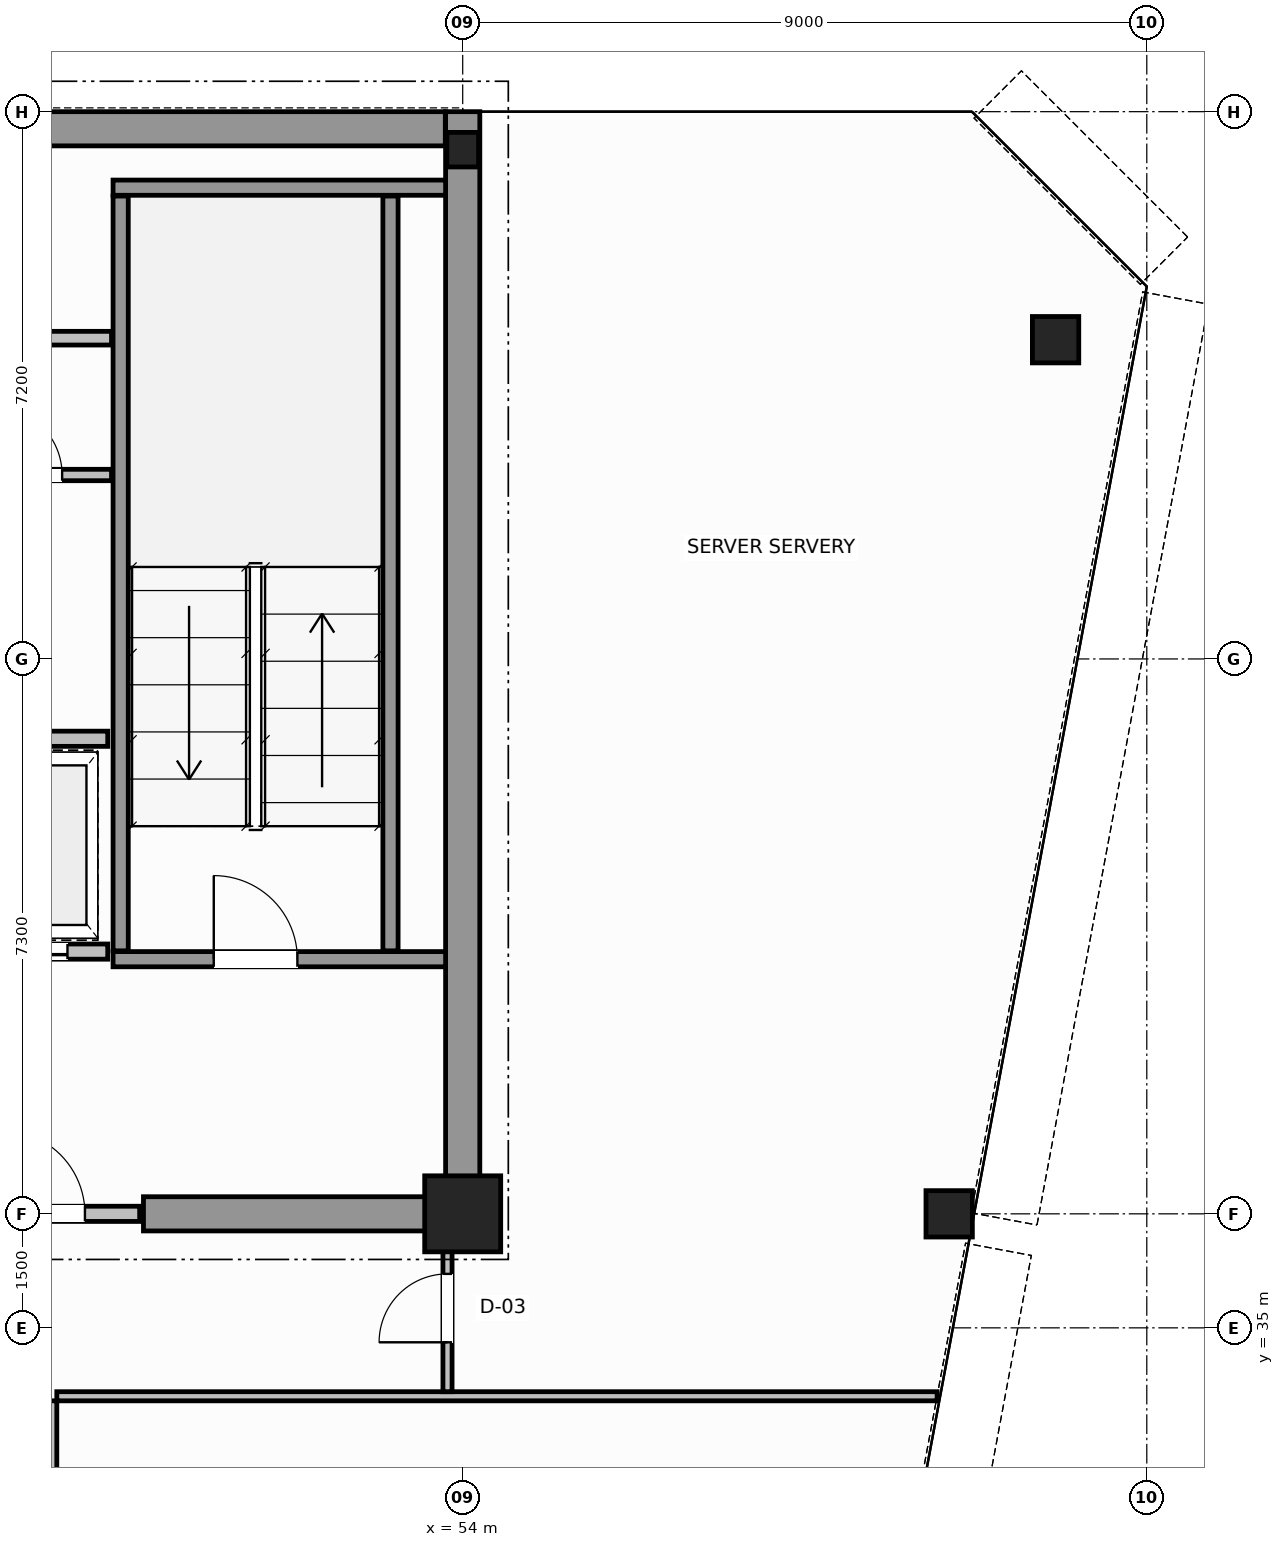
"""IFC4 building model, lengths in metres.
Left out: names, types, materials, properties, quantities, classifications, styles, units other than length and angle.
Written with IfcOpenShell. Run it as: python <this file> out.ifc"""

import sys

from ifc_helpers import new_model, si_unit, direction, frame, frame_2d, origin, origin_2d, place, context, subcontext, project, spatial, rectangle, hollow_circle, i_section, extrude, source, transform, mapped, element, fill, save


model = new_model("IFC4")
c1 = context("Model", 3, precision=1e-05, world=origin(), true_north=direction((0.0, 1.0)))
c2 = subcontext(c1, "Body", "Model", "MODEL_VIEW")
j1 = project(units=[si_unit("LENGTHUNIT", "METRE"), si_unit("PLANEANGLEUNIT", "RADIAN")], contexts=[c1])
p1 = place(None, origin())
s1 = spatial("IfcSite", under=j1, at=p1, CompositionType="ELEMENT")
p2 = place(p1, origin())
s2 = spatial("IfcBuilding", under=s1, at=p2, CompositionType="ELEMENT")
p3 = place(p2, frame((0.0, 0.0, 249.8)))
s3 = spatial("IfcBuildingStorey", under=s2, at=p3, CompositionType="ELEMENT", Elevation=249.8)
m1 = source(origin(), c2, "Body", "SweptSolid", [
    extrude(rectangle(XDim=1.0, YDim=1.0, at=origin_2d()), origin(), (0.0, 0.0, 1.0), 3.8),
])
p4 = place(p3, frame((54.0, 36.5, 0.0), z_axis=(0.0, 0.0, 1.0), x_axis=(1.0, 0.0, 0.0)))
e1 = element("IfcColumn", 1, at=p4, inside=s3, PredefinedType="COLUMN", context=c2, shape_type="MappedRepresentation", body=[
    mapped(m1, transform((0.0, 0.0, 0.0), scale=1.0)),
])
m2 = source(origin(), c2, "Body", "SweptSolid", [
    extrude(i_section(OverallWidth=0.418, OverallDepth=0.455, WebThickness=0.042, FlangeThickness=0.058, FilletRadius=0.015, at=origin_2d()), origin(), (0.0, 0.0, 1.0), 3.8),
])
p5 = place(p3, frame((54.0, 50.5, 0.0), z_axis=(0.0, 0.0, 1.0), x_axis=(1.0, 0.0, 0.0)))
e2 = element("IfcColumn", 2, at=p5, inside=s3, PredefinedType="COLUMN", context=c2, shape_type="MappedRepresentation", body=[
    mapped(m2, transform((0.0, 0.0, 0.0), scale=1.0)),
])
m3 = source(origin(), c2, "Body", "SweptSolid", [
    extrude(hollow_circle(Radius=0.305, WallThickness=0.03, at=origin_2d()), origin(), (0.0, 0.0, 1.0), 3.8),
])
for number, where, z_axis, x_axis in (
    (3, (61.8, 48.0, 0.0), (0.0, 0.0, 1.0), (1.0, 0.0, 0.0)),
    (4, (60.4, 36.5, 0.0), (0.0, 0.0, 1.0), (1.0, 0.0, 0.0)),
):
    element("IfcColumn", number, at=place(p3, frame(where, z_axis=z_axis, x_axis=x_axis)), inside=s3, PredefinedType="COLUMN", context=c2, shape_type="MappedRepresentation", body=[
        mapped(m3, transform((0.0, 0.0, 0.0), scale=1.0)),
    ])
p6 = place(p3, frame((34.002, 50.775, 0.0), z_axis=(0.0, 0.0, 1.0), x_axis=(1.0, 0.0, 0.0)))
e5 = element("IfcWall", 5, at=p6, inside=s3, PredefinedType="SHEAR", context=c2, shape_type="SweptSolid", body=[
    extrude(rectangle(XDim=19.769, YDim=0.45, at=frame_2d((9.885, 0.0))), origin(), (0.0, 0.0, 1.0), 3.8),
])
p7 = place(p3, frame((54.0, 36.5, 0.0), z_axis=(0.0, 0.0, 1.0), x_axis=(0.0, 1.0, 0.0)))
e6 = element("IfcWall", 6, at=p7, inside=s3, PredefinedType="SHEAR", context=c2, shape_type="SweptSolid", body=[
    extrude(rectangle(XDim=14.5, YDim=0.45, at=frame_2d((7.25, 0.0))), origin(), (0.0, 0.0, 1.0), 3.8),
])
p8 = place(p3, frame((49.8, 36.5, 0.0), z_axis=(0.0, 0.0, 1.0), x_axis=(1.0, 0.0, 0.0)))
e7 = element("IfcWall", 7, at=p8, inside=s3, PredefinedType="SHEAR", context=c2, shape_type="SweptSolid", body=[
    extrude(rectangle(XDim=3.955, YDim=0.45, at=frame_2d((1.978, 0.0))), origin(), (0.0, 0.0, 1.0), 2.58),
])
p9 = place(p3, frame((49.4, 39.85, 0.0), z_axis=(0.0, 0.0, 1.0), x_axis=(1.0, 0.0, 0.0)))
e8 = element("IfcWall", 8, at=p9, inside=s3, PredefinedType="SOLIDWALL", context=c2, shape_type="SweptSolid", body=[
    extrude(rectangle(XDim=4.375, YDim=0.2, at=frame_2d((2.188, 0.0))), origin(), (0.0, 0.0, 1.0), 3.8),
])
p10 = place(p9, frame((1.325, 0.0, 0.0)))
e9 = element("IfcOpeningElement", 9, at=p10, cuts=e8, PredefinedType="OPENING", context=c2, shape_type="SweptSolid", body=[
    extrude(rectangle(XDim=1.1, YDim=2.15, at=frame_2d((0.55, 1.075))), frame((0.0, 0.11, 0.0), z_axis=(0.0, -1.0, 0.0), x_axis=(1.0, 0.0, 0.0)), (0.0, 0.0, 1.0), 0.22),
])
p11 = place(p3, frame((49.4, 50.0, 0.0), z_axis=(0.0, 0.0, 1.0), x_axis=(1.0, 0.0, 0.0)))
e10 = element("IfcWall", 10, at=p11, inside=s3, PredefinedType="SOLIDWALL", context=c2, shape_type="SweptSolid", body=[
    extrude(rectangle(XDim=4.375, YDim=0.2, at=frame_2d((2.188, 0.0))), origin(), (0.0, 0.0, 1.0), 3.8),
])
for number, where, z_axis, x_axis in (
    (11, (49.5, 39.96, 0.0), (0.0, 0.0, 1.0), (0.0, 1.0, 0.0)),
    (12, (53.05, 39.96, 0.0), (0.0, 0.0, 1.0), (0.0, 1.0, 0.0)),
):
    element("IfcWall", number, at=place(p3, frame(where, z_axis=z_axis, x_axis=x_axis)), inside=s3, PredefinedType="SOLIDWALL", context=c2, shape_type="SweptSolid", body=[
        extrude(rectangle(XDim=9.93, YDim=0.2, at=frame_2d((4.965, 0.0))), origin(), (0.0, 0.0, 1.0), 3.8),
    ])
p12 = place(p3, frame((47.28, 36.5, 0.0), z_axis=(0.0, 0.0, 1.0), x_axis=(1.0, 0.0, 0.0)))
e13 = element("IfcWall", 13, at=p12, inside=s3, PredefinedType="SOLIDWALL", context=c2, shape_type="SweptSolid", body=[
    extrude(rectangle(XDim=2.47, YDim=0.2, at=frame_2d((1.235, 0.0))), origin(), (0.0, 0.0, 1.0), 2.57),
])
p13 = place(p12, frame((0.65, 0.0, 0.0)))
e14 = element("IfcOpeningElement", 14, at=p13, cuts=e13, PredefinedType="OPENING", context=c2, shape_type="SweptSolid", body=[
    extrude(rectangle(XDim=1.1, YDim=2.15, at=frame_2d((0.55, 1.075))), frame((0.0, 0.11, 0.0), z_axis=(0.0, -1.0, 0.0), x_axis=(1.0, 0.0, 0.0)), (0.0, 0.0, 1.0), 0.22),
])
p14 = place(p3, frame((47.17, 39.95, 0.0), z_axis=(0.0, 0.0, 1.0), x_axis=(1.0, 0.0, 0.0)))
e15 = element("IfcWall", 15, at=p14, inside=s3, PredefinedType="SOLIDWALL", context=c2, shape_type="SweptSolid", body=[
    extrude(rectangle(XDim=2.16, YDim=0.2, at=frame_2d((1.08, 0.0))), origin(), (0.0, 0.0, 1.0), 3.58),
])
p15 = place(p14, frame((0.53, 0.0, 0.0)))
e16 = element("IfcOpeningElement", 16, at=p15, cuts=e15, PredefinedType="OPENING", context=c2, shape_type="SweptSolid", body=[
    extrude(rectangle(XDim=1.1, YDim=2.15, at=frame_2d((0.55, 1.075))), frame((0.0, 0.11, 0.0), z_axis=(0.0, -1.0, 0.0), x_axis=(1.0, 0.0, 0.0)), (0.0, 0.0, 1.0), 0.22),
])
p16 = place(p3, frame((47.17, 42.75, 0.0), z_axis=(0.0, 0.0, 1.0), x_axis=(1.0, 0.0, 0.0)))
e17 = element("IfcWall", 17, at=p16, inside=s3, PredefinedType="SOLIDWALL", context=c2, shape_type="SweptSolid", body=[
    extrude(rectangle(XDim=2.16, YDim=0.2, at=frame_2d((1.08, 0.0))), origin(), (0.0, 0.0, 1.0), 3.58),
])
p17 = place(p3, frame((47.28, 46.22, 0.0), z_axis=(0.0, 0.0, 1.0), x_axis=(1.0, 0.0, 0.0)))
e18 = element("IfcWall", 18, at=p17, inside=s3, PredefinedType="PARTITIONING", context=c2, shape_type="SweptSolid", body=[
    extrude(rectangle(XDim=2.1, YDim=0.15, at=frame_2d((1.05, 0.0))), origin(), (0.0, 0.0, 1.0), 3.58),
])
p18 = place(p17, frame((0.55, 0.0, 0.0)))
e19 = element("IfcOpeningElement", 19, at=p18, cuts=e18, PredefinedType="OPENING", context=c2, shape_type="SweptSolid", body=[
    extrude(rectangle(XDim=0.9, YDim=2.1, at=frame_2d((0.45, 1.05))), frame((0.0, 0.085, 0.0), z_axis=(0.0, -1.0, 0.0), x_axis=(1.0, 0.0, 0.0)), (0.0, 0.0, 1.0), 0.17),
])
p19 = place(p3, frame((18.62, 48.02, 0.0), z_axis=(0.0, 0.0, 1.0), x_axis=(1.0, 0.0, 0.0)))
e20 = element("IfcWall", 20, at=p19, inside=s3, PredefinedType="PLUMBINGWALL", context=c2, shape_type="SweptSolid", body=[
    extrude(rectangle(XDim=30.76, YDim=0.18, at=frame_2d((15.38, 0.0))), origin(), (0.0, 0.0, 1.0), 3.58),
])
p20 = place(p19, frame((1.655, 0.0, 0.0)))
e21 = element("IfcOpeningElement", 21, at=p20, cuts=e20, PredefinedType="OPENING", context=c2, shape_type="SweptSolid", body=[
    extrude(rectangle(XDim=0.9, YDim=2.15, at=frame_2d((0.45, 1.075))), frame((0.0, 0.1, 0.0), z_axis=(0.0, -1.0, 0.0), x_axis=(1.0, 0.0, 0.0)), (0.0, 0.0, 1.0), 0.2),
])
p21 = place(p19, frame((6.03, 0.0, 0.0)))
e22 = element("IfcOpeningElement", 22, at=p21, cuts=e20, PredefinedType="OPENING", context=c2, shape_type="SweptSolid", body=[
    extrude(rectangle(XDim=0.9, YDim=2.15, at=frame_2d((0.45, 1.075))), frame((0.0, 0.1, 0.0), z_axis=(0.0, -1.0, 0.0), x_axis=(1.0, 0.0, 0.0)), (0.0, 0.0, 1.0), 0.2),
])
p22 = place(p19, frame((10.93, 0.0, 0.0)))
e23 = element("IfcOpeningElement", 23, at=p22, cuts=e20, PredefinedType="OPENING", context=c2, shape_type="SweptSolid", body=[
    extrude(rectangle(XDim=0.9, YDim=2.15, at=frame_2d((0.45, 1.075))), frame((0.0, 0.1, 0.0), z_axis=(0.0, -1.0, 0.0), x_axis=(1.0, 0.0, 0.0)), (0.0, 0.0, 1.0), 0.2),
])
p23 = place(p19, frame((16.13, 0.0, 0.0)))
e24 = element("IfcOpeningElement", 24, at=p23, cuts=e20, PredefinedType="OPENING", context=c2, shape_type="SweptSolid", body=[
    extrude(rectangle(XDim=0.9, YDim=2.15, at=frame_2d((0.45, 1.075))), frame((0.0, 0.1, 0.0), z_axis=(0.0, -1.0, 0.0), x_axis=(1.0, 0.0, 0.0)), (0.0, 0.0, 1.0), 0.2),
])
p24 = place(p19, frame((21.73, 0.0, 0.0)))
e25 = element("IfcOpeningElement", 25, at=p24, cuts=e20, PredefinedType="OPENING", context=c2, shape_type="SweptSolid", body=[
    extrude(rectangle(XDim=0.9, YDim=2.15, at=frame_2d((0.45, 1.075))), frame((0.0, 0.1, 0.0), z_axis=(0.0, -1.0, 0.0), x_axis=(1.0, 0.0, 0.0)), (0.0, 0.0, 1.0), 0.2),
])
p25 = place(p19, frame((27.505, 0.0, 0.0)))
e26 = element("IfcOpeningElement", 26, at=p25, cuts=e20, PredefinedType="OPENING", context=c2, shape_type="SweptSolid", body=[
    extrude(rectangle(XDim=0.9, YDim=2.15, at=frame_2d((0.45, 1.075))), frame((0.0, 0.1, 0.0), z_axis=(0.0, -1.0, 0.0), x_axis=(1.0, 0.0, 0.0)), (0.0, 0.0, 1.0), 0.2),
])
p26 = place(p3, frame((48.66, 34.1, 0.0), z_axis=(0.0, 0.0, 1.0), x_axis=(1.0, 0.0, 0.0)))
e27 = element("IfcWall", 27, at=p26, inside=s3, PredefinedType="PARTITIONING", context=c2, shape_type="SweptSolid", body=[
    extrude(rectangle(XDim=11.582, YDim=0.12, at=frame_2d((5.791, 0.0))), origin(), (0.0, 0.0, 1.0), 3.58),
])
p27 = place(p3, frame((53.8, 34.16, 0.0), z_axis=(0.0, 0.0, 1.0), x_axis=(0.0, 1.0, 0.0)))
e28 = element("IfcWall", 28, at=p27, inside=s3, PredefinedType="PARTITIONING", context=c2, shape_type="SweptSolid", body=[
    extrude(rectangle(XDim=2.28, YDim=0.12, at=frame_2d((1.14, 0.0))), origin(), (0.0, 0.0, 1.0), 3.58),
])
p28 = place(p27, frame((0.65, 0.0, 0.0)))
e29 = element("IfcOpeningElement", 29, at=p28, cuts=e28, PredefinedType="OPENING", context=c2, shape_type="SweptSolid", body=[
    extrude(rectangle(XDim=0.9, YDim=2.15, at=frame_2d((0.45, 1.075))), frame((0.0, 0.07, 0.0), z_axis=(0.0, -1.0, 0.0), x_axis=(1.0, 0.0, 0.0)), (0.0, 0.0, 1.0), 0.14),
])
p29 = place(p3, frame((48.6, 20.4, 0.0), z_axis=(0.0, 0.0, 1.0), x_axis=(0.0, 1.0, 0.0)))
e30 = element("IfcWall", 30, at=p29, inside=s3, PredefinedType="PARTITIONING", context=c2, shape_type="SweptSolid", body=[
    extrude(rectangle(XDim=13.64, YDim=0.12, at=frame_2d((6.82, 0.0))), origin(), (0.0, 0.0, 1.0), 3.58),
])
p30 = place(p29, frame((2.55, 0.0, 0.0)))
e31 = element("IfcOpeningElement", 31, at=p30, cuts=e30, PredefinedType="OPENING", context=c2, shape_type="SweptSolid", body=[
    extrude(rectangle(XDim=0.9, YDim=2.15, at=frame_2d((0.45, 1.075))), frame((0.0, 0.07, 0.0), z_axis=(0.0, -1.0, 0.0), x_axis=(1.0, 0.0, 0.0)), (0.0, 0.0, 1.0), 0.14),
])
p31 = place(p29, frame((9.37, 0.0, 0.0)))
e32 = element("IfcOpeningElement", 32, at=p31, cuts=e30, PredefinedType="OPENING", context=c2, shape_type="SweptSolid", body=[
    extrude(rectangle(XDim=0.9, YDim=2.15, at=frame_2d((0.45, 1.075))), frame((0.0, 0.07, 0.0), z_axis=(0.0, -1.0, 0.0), x_axis=(1.0, 0.0, 0.0)), (0.0, 0.0, 1.0), 0.14),
])
m4 = source(origin(), c2, "Body", "SweptSolid", [
    extrude(rectangle(XDim=1.1, YDim=2.15, at=frame_2d((0.55, 1.075))), frame((0.0, 0.025, 0.0), z_axis=(0.0, -1.0, 0.0), x_axis=(1.0, 0.0, 0.0)), (0.0, 0.0, 1.0), 0.05),
])
p32 = place(p10, origin())
e33 = element("IfcDoor", 33, at=p32, inside=s3, OperationType="SINGLE_SWING_RIGHT", PredefinedType="DOOR", context=c2, shape_type="MappedRepresentation", body=[
    mapped(m4, transform((0.0, 0.0, 0.0), scale=1.0)),
])
fill(e9, e33)
p33 = place(p13, origin())
e34 = element("IfcDoor", 34, at=p33, inside=s3, OperationType="SINGLE_SWING_LEFT", PredefinedType="DOOR", context=c2, shape_type="MappedRepresentation", body=[
    mapped(m4, transform((0.0, 0.0, 0.0), scale=1.0)),
])
fill(e14, e34)
p34 = place(p15, origin())
e35 = element("IfcDoor", 35, at=p34, inside=s3, OperationType="DOUBLE_DOOR_SLIDING", PredefinedType="DOOR", context=c2, shape_type="MappedRepresentation", body=[
    mapped(m4, transform((0.0, 0.0, 0.0), scale=1.0)),
])
fill(e16, e35)
m5 = source(origin(), c2, "Body", "SweptSolid", [
    extrude(rectangle(XDim=0.9, YDim=2.1, at=frame_2d((0.45, 1.05))), frame((0.0, 0.025, 0.0), z_axis=(0.0, -1.0, 0.0), x_axis=(1.0, 0.0, 0.0)), (0.0, 0.0, 1.0), 0.05),
])
p35 = place(p18, origin())
e36 = element("IfcDoor", 36, at=p35, inside=s3, OperationType="SINGLE_SWING_RIGHT", PredefinedType="DOOR", context=c2, shape_type="MappedRepresentation", body=[
    mapped(m5, transform((0.0, 0.0, 0.0), scale=1.0)),
])
fill(e19, e36)
m6 = source(origin(), c2, "Body", "SweptSolid", [
    extrude(rectangle(XDim=0.9, YDim=2.15, at=frame_2d((0.45, 1.075))), frame((0.0, 0.025, 0.0), z_axis=(0.0, -1.0, 0.0), x_axis=(1.0, 0.0, 0.0)), (0.0, 0.0, 1.0), 0.05),
])
p36 = place(p28, origin())
e37 = element("IfcDoor", 37, at=p36, inside=s3, OperationType="SINGLE_SWING_RIGHT", PredefinedType="DOOR", context=c2, shape_type="MappedRepresentation", body=[
    mapped(m6, transform((0.0, 0.0, 0.0), scale=1.0)),
])
fill(e29, e37)
save(model, sys.argv[1])
